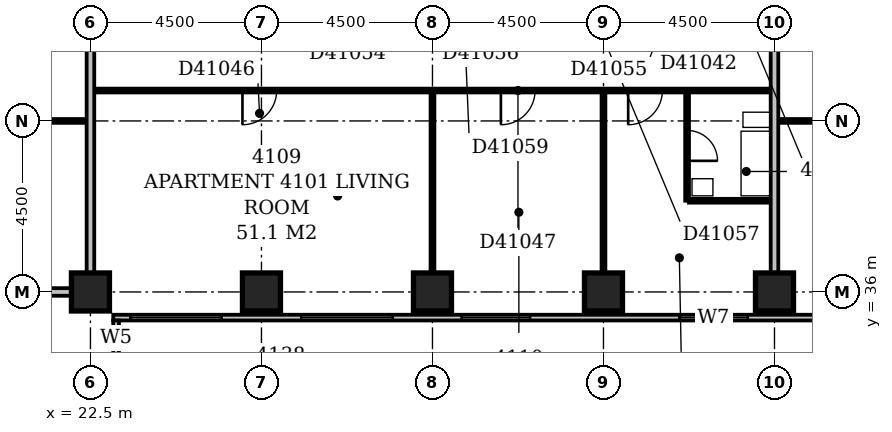
"""IFC4 building model, lengths in metres.
Left out: names, types, materials, properties, quantities, classifications, styles, units other than length and angle.
Written with IfcOpenShell. Run it as: python <this file> out.ifc"""

import sys

from ifc_helpers import new_model, si_unit, direction, frame, frame_2d, origin, origin_2d, place, context, subcontext, project, spatial, rectangle, extrude, element, fill, save


model = new_model("IFC4")
c1 = context("Model", 3, precision=1e-05, world=origin(), true_north=direction((0.0, 1.0)))
c2 = subcontext(c1, "Body", "Model", "MODEL_VIEW")
j1 = project(units=[si_unit("LENGTHUNIT", "METRE"), si_unit("PLANEANGLEUNIT", "RADIAN")], contexts=[c1])
p1 = place(None, origin())
s1 = spatial("IfcSite", under=j1, at=p1, CompositionType="ELEMENT")
p2 = place(p1, origin())
s2 = spatial("IfcBuilding", under=s1, at=p2, CompositionType="ELEMENT")
p3 = place(p2, frame((0.0, 0.0, 162.8)))
s3 = spatial("IfcBuildingStorey", under=s2, at=p3, CompositionType="ELEMENT", Elevation=162.8)
for number, where, z_axis, x_axis in (
    (1, (22.5, 36.0, -0.3), (0.0, 0.0, 1.0), (1.0, 0.0, 0.0)),
    (2, (27.0, 36.0, -0.3), (0.0, 0.0, 1.0), (1.0, 0.0, 0.0)),
    (3, (31.5, 36.0, -0.3), (0.0, 0.0, 1.0), (1.0, 0.0, 0.0)),
    (4, (36.0, 36.0, -0.3), (0.0, 0.0, 1.0), (1.0, 0.0, 0.0)),
    (5, (40.5, 36.0, -0.3), (0.0, 0.0, 1.0), (1.0, 0.0, 0.0)),
):
    element("IfcColumn", number, at=place(p3, frame(where, z_axis=z_axis, x_axis=x_axis)), inside=s3, PredefinedType="COLUMN", context=c2, shape_type="SweptSolid", body=[
        extrude(rectangle(XDim=1.0, YDim=1.0, at=origin_2d()), origin(), (0.0, 0.0, 1.0), 3.6),
    ])
p4 = place(p3, frame((23.175, 17.4, 0.0), z_axis=(0.0, 0.0, 1.0), x_axis=(0.0, 1.0, 0.0)))
e6 = element("IfcWall", 6, at=p4, inside=s3, PredefinedType="STANDARD", context=c2, shape_type="SweptSolid", body=[
    extrude(rectangle(XDim=17.85, YDim=0.15, at=frame_2d((8.925, 0.0))), origin(), (0.0, 0.0, 1.0), 2.7),
])
p5 = place(p4, frame((1.65, 0.0, 0.6)))
e7 = element("IfcOpeningElement", 7, at=p5, cuts=e6, PredefinedType="OPENING", context=c2, shape_type="SweptSolid", body=[
    extrude(rectangle(XDim=2.4, YDim=1.8, at=frame_2d((1.2, 0.9))), frame((0.0, 0.087, 0.0), z_axis=(0.0, -1.0, 0.0), x_axis=(1.0, 0.0, 0.0)), (0.0, 0.0, 1.0), 0.174),
])
p6 = place(p4, frame((6.15, 0.0, 0.6)))
e8 = element("IfcOpeningElement", 8, at=p6, cuts=e6, PredefinedType="OPENING", context=c2, shape_type="SweptSolid", body=[
    extrude(rectangle(XDim=2.4, YDim=1.8, at=frame_2d((1.2, 0.9))), frame((0.0, 0.087, 0.0), z_axis=(0.0, -1.0, 0.0), x_axis=(1.0, 0.0, 0.0)), (0.0, 0.0, 1.0), 0.174),
])
p7 = place(p4, frame((10.65, 0.0, 0.6)))
e9 = element("IfcOpeningElement", 9, at=p7, cuts=e6, PredefinedType="OPENING", context=c2, shape_type="SweptSolid", body=[
    extrude(rectangle(XDim=2.4, YDim=1.8, at=frame_2d((1.2, 0.9))), frame((0.0, 0.087, 0.0), z_axis=(0.0, -1.0, 0.0), x_axis=(1.0, 0.0, 0.0)), (0.0, 0.0, 1.0), 0.174),
])
p8 = place(p4, frame((17.152, 0.0, 0.6)))
e10 = element("IfcOpeningElement", 10, at=p8, cuts=e6, PredefinedType="OPENING", context=c2, shape_type="SweptSolid", body=[
    extrude(rectangle(XDim=0.45, YDim=1.8, at=frame_2d((0.225, 0.9))), frame((0.0, 0.087, 0.0), z_axis=(0.0, -1.0, 0.0), x_axis=(1.0, 0.0, 0.0)), (0.0, 0.0, 1.0), 0.174),
])
p9 = place(p3, frame((23.1, 35.325, 0.0), z_axis=(0.0, 0.0, 1.0), x_axis=(1.0, 0.0, 0.0)))
e11 = element("IfcWall", 11, at=p9, inside=s3, PredefinedType="STANDARD", context=c2, shape_type="SweptSolid", body=[
    extrude(rectangle(XDim=45.15, YDim=0.15, at=frame_2d((22.575, 0.0))), origin(), (0.0, 0.0, 1.0), 2.7),
])
p10 = place(p9, frame((0.45, 0.0, 0.6)))
e12 = element("IfcOpeningElement", 12, at=p10, cuts=e11, PredefinedType="OPENING", context=c2, shape_type="SweptSolid", body=[
    extrude(rectangle(XDim=2.4, YDim=1.8, at=frame_2d((1.2, 0.9))), frame((0.0, 0.087, 0.0), z_axis=(0.0, -1.0, 0.0), x_axis=(1.0, 0.0, 0.0)), (0.0, 0.0, 1.0), 0.174),
])
p11 = place(p9, frame((4.95, 0.0, 0.6)))
e13 = element("IfcOpeningElement", 13, at=p11, cuts=e11, PredefinedType="OPENING", context=c2, shape_type="SweptSolid", body=[
    extrude(rectangle(XDim=2.4, YDim=1.8, at=frame_2d((1.2, 0.9))), frame((0.0, 0.087, 0.0), z_axis=(0.0, -1.0, 0.0), x_axis=(1.0, 0.0, 0.0)), (0.0, 0.0, 1.0), 0.174),
])
p12 = place(p9, frame((9.167, 0.0, 0.6)))
e14 = element("IfcOpeningElement", 14, at=p12, cuts=e11, PredefinedType="OPENING", context=c2, shape_type="SweptSolid", body=[
    extrude(rectangle(XDim=1.8, YDim=1.8, at=frame_2d((0.9, 0.9))), frame((0.0, 0.087, 0.0), z_axis=(0.0, -1.0, 0.0), x_axis=(1.0, 0.0, 0.0)), (0.0, 0.0, 1.0), 0.174),
])
p13 = place(p9, frame((14.895, 0.0, 0.6)))
e15 = element("IfcOpeningElement", 15, at=p13, cuts=e11, PredefinedType="OPENING", context=c2, shape_type="SweptSolid", body=[
    extrude(rectangle(XDim=1.8, YDim=1.8, at=frame_2d((0.9, 0.9))), frame((0.0, 0.087, 0.0), z_axis=(0.0, -1.0, 0.0), x_axis=(1.0, 0.0, 0.0)), (0.0, 0.0, 1.0), 0.174),
])
p14 = place(p9, frame((18.45, 0.0, 0.6)))
e16 = element("IfcOpeningElement", 16, at=p14, cuts=e11, PredefinedType="OPENING", context=c2, shape_type="SweptSolid", body=[
    extrude(rectangle(XDim=2.4, YDim=1.8, at=frame_2d((1.2, 0.9))), frame((0.0, 0.087, 0.0), z_axis=(0.0, -1.0, 0.0), x_axis=(1.0, 0.0, 0.0)), (0.0, 0.0, 1.0), 0.174),
])
p15 = place(p9, frame((22.95, 0.0, 0.6)))
e17 = element("IfcOpeningElement", 17, at=p15, cuts=e11, PredefinedType="OPENING", context=c2, shape_type="SweptSolid", body=[
    extrude(rectangle(XDim=2.4, YDim=1.8, at=frame_2d((1.2, 0.9))), frame((0.0, 0.087, 0.0), z_axis=(0.0, -1.0, 0.0), x_axis=(1.0, 0.0, 0.0)), (0.0, 0.0, 1.0), 0.174),
])
p16 = place(p9, frame((27.45, 0.0, 0.6)))
e18 = element("IfcOpeningElement", 18, at=p16, cuts=e11, PredefinedType="OPENING", context=c2, shape_type="SweptSolid", body=[
    extrude(rectangle(XDim=2.4, YDim=1.8, at=frame_2d((1.2, 0.9))), frame((0.0, 0.087, 0.0), z_axis=(0.0, -1.0, 0.0), x_axis=(1.0, 0.0, 0.0)), (0.0, 0.0, 1.0), 0.174),
])
p17 = place(p9, frame((31.95, 0.0, 0.6)))
e19 = element("IfcOpeningElement", 19, at=p17, cuts=e11, PredefinedType="OPENING", context=c2, shape_type="SweptSolid", body=[
    extrude(rectangle(XDim=2.4, YDim=1.8, at=frame_2d((1.2, 0.9))), frame((0.0, 0.087, 0.0), z_axis=(0.0, -1.0, 0.0), x_axis=(1.0, 0.0, 0.0)), (0.0, 0.0, 1.0), 0.174),
])
p18 = place(p9, frame((36.45, 0.0, 0.6)))
e20 = element("IfcOpeningElement", 20, at=p18, cuts=e11, PredefinedType="OPENING", context=c2, shape_type="SweptSolid", body=[
    extrude(rectangle(XDim=2.4, YDim=1.8, at=frame_2d((1.2, 0.9))), frame((0.0, 0.087, 0.0), z_axis=(0.0, -1.0, 0.0), x_axis=(1.0, 0.0, 0.0)), (0.0, 0.0, 1.0), 0.174),
])
p19 = place(p9, frame((40.61, 0.0, 0.6)))
e21 = element("IfcOpeningElement", 21, at=p19, cuts=e11, PredefinedType="OPENING", context=c2, shape_type="SweptSolid", body=[
    extrude(rectangle(XDim=1.2, YDim=1.8, at=frame_2d((0.6, 0.9))), frame((0.0, 0.087, 0.0), z_axis=(0.0, -1.0, 0.0), x_axis=(1.0, 0.0, 0.0)), (0.0, 0.0, 1.0), 0.174),
])
for number, where, z_axis, x_axis in (
    (22, (9.1, 36.0, 0.0), (0.0, 0.0, 1.0), (1.0, 0.0, 0.0)),
    (23, (22.5, 36.5, 0.0), (0.0, 0.0, 1.0), (0.0, 1.0, 0.0)),
):
    element("IfcWall", number, at=place(p3, frame(where, z_axis=z_axis, x_axis=x_axis)), inside=s3, PredefinedType="PARTITIONING", context=c2, shape_type="SweptSolid", body=[
        extrude(rectangle(XDim=12.9, YDim=0.2, at=frame_2d((6.45, 0.0))), origin(), (0.0, 0.0, 1.0), 3.3),
    ])
p20 = place(p3, frame((31.5, 36.5, 0.0), z_axis=(0.0, 0.0, 1.0), x_axis=(0.0, 1.0, 0.0)))
e24 = element("IfcWall", 24, at=p20, inside=s3, PredefinedType="PARTITIONING", context=c2, shape_type="SweptSolid", body=[
    extrude(rectangle(XDim=4.75, YDim=0.1, at=frame_2d((2.375, 0.0))), origin(), (0.0, 0.0, 1.0), 3.3),
])
p21 = place(p3, frame((36.0, 36.5, 0.0), z_axis=(0.0, 0.0, 1.0), x_axis=(0.0, 1.0, 0.0)))
e25 = element("IfcWall", 25, at=p21, inside=s3, PredefinedType="PARTITIONING", context=c2, shape_type="SweptSolid", body=[
    extrude(rectangle(XDim=4.75, YDim=0.1, at=frame_2d((2.375, 0.0))), origin(), (0.0, 0.0, 1.0), 2.4),
])
p22 = place(p3, frame((40.5, 36.5, 0.0), z_axis=(0.0, 0.0, 1.0), x_axis=(0.0, 1.0, 0.0)))
e26 = element("IfcWall", 26, at=p22, inside=s3, PredefinedType="PARTITIONING", context=c2, shape_type="SweptSolid", body=[
    extrude(rectangle(XDim=12.9, YDim=0.2, at=frame_2d((6.45, 0.0))), origin(), (0.0, 0.0, 1.0), 3.3),
])
p23 = place(p3, frame((38.2, 38.4, 0.0), z_axis=(0.0, 0.0, 1.0), x_axis=(0.0, 1.0, 0.0)))
e27 = element("IfcWall", 27, at=p23, inside=s3, PredefinedType="PLUMBINGWALL", context=c2, shape_type="SweptSolid", body=[
    extrude(rectangle(XDim=2.85, YDim=0.1, at=frame_2d((1.425, 0.0))), origin(), (0.0, 0.0, 1.0), 3.3),
])
p24 = place(p23, frame((1.05, 0.0, 0.0)))
e28 = element("IfcOpeningElement", 28, at=p24, cuts=e27, PredefinedType="OPENING", context=c2, shape_type="SweptSolid", body=[
    extrude(rectangle(XDim=0.8, YDim=2.1, at=frame_2d((0.4, 1.05))), frame((0.0, 0.062, 0.0), z_axis=(0.0, -1.0, 0.0), x_axis=(1.0, 0.0, 0.0)), (0.0, 0.0, 1.0), 0.124),
])
p25 = place(p3, frame((38.25, 38.4, 0.0), z_axis=(0.0, 0.0, 1.0), x_axis=(1.0, 0.0, 0.0)))
e29 = element("IfcWall", 29, at=p25, inside=s3, PredefinedType="PLUMBINGWALL", context=c2, shape_type="SweptSolid", body=[
    extrude(rectangle(XDim=2.15, YDim=0.1, at=frame_2d((1.075, 0.0))), origin(), (0.0, 0.0, 1.0), 3.3),
])
p26 = place(p3, frame((9.1, 40.5, 0.0), z_axis=(0.0, 0.0, 1.0), x_axis=(1.0, 0.0, 0.0)))
e30 = element("IfcWall", 30, at=p26, inside=s3, PredefinedType="PARTITIONING", context=c2, shape_type="SweptSolid", body=[
    extrude(rectangle(XDim=13.3, YDim=0.1, at=frame_2d((6.65, 0.0))), origin(), (0.0, 0.0, 1.0), 3.3),
])
p27 = place(p3, frame((40.6, 40.5, 0.0), z_axis=(0.0, 0.0, 1.0), x_axis=(1.0, 0.0, 0.0)))
e31 = element("IfcWall", 31, at=p27, inside=s3, PredefinedType="PARTITIONING", context=c2, shape_type="SweptSolid", body=[
    extrude(rectangle(XDim=4.3, YDim=0.1, at=frame_2d((2.15, 0.0))), origin(), (0.0, 0.0, 1.0), 3.3),
])
p28 = place(p27, frame((1.7, 0.0, 0.0)))
e32 = element("IfcOpeningElement", 32, at=p28, cuts=e31, PredefinedType="OPENING", context=c2, shape_type="SweptSolid", body=[
    extrude(rectangle(XDim=0.9, YDim=2.1, at=frame_2d((0.45, 1.05))), frame((0.0, 0.062, 0.0), z_axis=(0.0, -1.0, 0.0), x_axis=(1.0, 0.0, 0.0)), (0.0, 0.0, 1.0), 0.124),
])
p29 = place(p3, frame((22.6, 41.3, 0.0), z_axis=(0.0, 0.0, 1.0), x_axis=(1.0, 0.0, 0.0)))
e33 = element("IfcWall", 33, at=p29, inside=s3, PredefinedType="PARTITIONING", context=c2, shape_type="SweptSolid", body=[
    extrude(rectangle(XDim=17.8, YDim=0.1, at=frame_2d((8.9, 0.0))), origin(), (0.0, 0.0, 1.0), 3.3),
])
p30 = place(p29, frame((3.9, 0.0, 0.0)))
e34 = element("IfcOpeningElement", 34, at=p30, cuts=e33, PredefinedType="OPENING", context=c2, shape_type="SweptSolid", body=[
    extrude(rectangle(XDim=0.9, YDim=2.1, at=frame_2d((0.45, 1.05))), frame((0.0, 0.062, 0.0), z_axis=(0.0, -1.0, 0.0), x_axis=(1.0, 0.0, 0.0)), (0.0, 0.0, 1.0), 0.124),
])
p31 = place(p29, frame((10.7, 0.0, 0.0)))
e35 = element("IfcOpeningElement", 35, at=p31, cuts=e33, PredefinedType="OPENING", context=c2, shape_type="SweptSolid", body=[
    extrude(rectangle(XDim=0.9, YDim=2.1, at=frame_2d((0.45, 1.05))), frame((0.0, 0.062, 0.0), z_axis=(0.0, -1.0, 0.0), x_axis=(1.0, 0.0, 0.0)), (0.0, 0.0, 1.0), 0.124),
])
p32 = place(p29, frame((14.05, 0.0, 0.0)))
e36 = element("IfcOpeningElement", 36, at=p32, cuts=e33, PredefinedType="OPENING", context=c2, shape_type="SweptSolid", body=[
    extrude(rectangle(XDim=0.9, YDim=2.1, at=frame_2d((0.45, 1.05))), frame((0.0, 0.062, 0.0), z_axis=(0.0, -1.0, 0.0), x_axis=(1.0, 0.0, 0.0)), (0.0, 0.0, 1.0), 0.124),
])
p33 = place(p8, origin())
e37 = element("IfcWindow", 37, at=p33, inside=s3, PartitioningType="SINGLE_PANEL", PredefinedType="WINDOW", context=c2, shape_type="SweptSolid", body=[
    extrude(rectangle(XDim=0.45, YDim=1.8, at=frame_2d((0.225, 0.9))), frame((0.0, 0.03, 0.0), z_axis=(0.0, -1.0, 0.0), x_axis=(1.0, 0.0, 0.0)), (0.0, 0.0, 1.0), 0.06),
])
fill(e10, e37)
p34 = place(p10, origin())
e38 = element("IfcWindow", 38, at=p34, inside=s3, PartitioningType="SINGLE_PANEL", PredefinedType="WINDOW", context=c2, shape_type="SweptSolid", body=[
    extrude(rectangle(XDim=2.4, YDim=1.8, at=frame_2d((1.2, 0.9))), frame((0.0, 0.03, 0.0), z_axis=(0.0, -1.0, 0.0), x_axis=(1.0, 0.0, 0.0)), (0.0, 0.0, 1.0), 0.06),
])
fill(e12, e38)
p35 = place(p11, origin())
e39 = element("IfcWindow", 39, at=p35, inside=s3, PartitioningType="SINGLE_PANEL", PredefinedType="WINDOW", context=c2, shape_type="SweptSolid", body=[
    extrude(rectangle(XDim=2.4, YDim=1.8, at=frame_2d((1.2, 0.9))), frame((0.0, 0.03, 0.0), z_axis=(0.0, -1.0, 0.0), x_axis=(1.0, 0.0, 0.0)), (0.0, 0.0, 1.0), 0.06),
])
fill(e13, e39)
p36 = place(p12, origin())
e40 = element("IfcWindow", 40, at=p36, inside=s3, PartitioningType="SINGLE_PANEL", PredefinedType="WINDOW", context=c2, shape_type="SweptSolid", body=[
    extrude(rectangle(XDim=1.8, YDim=1.8, at=frame_2d((0.9, 0.9))), frame((0.0, 0.03, 0.0), z_axis=(0.0, -1.0, 0.0), x_axis=(1.0, 0.0, 0.0)), (0.0, 0.0, 1.0), 0.06),
])
fill(e14, e40)
p37 = place(p13, origin())
e41 = element("IfcWindow", 41, at=p37, inside=s3, PartitioningType="SINGLE_PANEL", PredefinedType="WINDOW", context=c2, shape_type="SweptSolid", body=[
    extrude(rectangle(XDim=1.8, YDim=1.8, at=frame_2d((0.9, 0.9))), frame((0.0, 0.03, 0.0), z_axis=(0.0, -1.0, 0.0), x_axis=(1.0, 0.0, 0.0)), (0.0, 0.0, 1.0), 0.06),
])
fill(e15, e41)
p38 = place(p24, frame((0.8, 0.0, 0.0), z_axis=(0.0, 0.0, 1.0), x_axis=(-1.0, 0.0, 0.0)))
e42 = element("IfcDoor", 42, at=p38, inside=s3, OperationType="SINGLE_SWING_RIGHT", PredefinedType="DOOR", context=c2, shape_type="SweptSolid", body=[
    extrude(rectangle(XDim=0.8, YDim=2.1, at=frame_2d((0.4, 1.05))), frame((0.0, 0.025, 0.0), z_axis=(0.0, -1.0, 0.0), x_axis=(1.0, 0.0, 0.0)), (0.0, 0.0, 1.0), 0.05),
])
fill(e28, e42)
p39 = place(p30, frame((0.9, 0.0, 0.0), z_axis=(0.0, 0.0, 1.0), x_axis=(-1.0, 0.0, 0.0)))
e43 = element("IfcDoor", 43, at=p39, inside=s3, OperationType="SINGLE_SWING_RIGHT", PredefinedType="DOOR", context=c2, shape_type="SweptSolid", body=[
    extrude(rectangle(XDim=0.9, YDim=2.1, at=frame_2d((0.45, 1.05))), frame((0.0, 0.025, 0.0), z_axis=(0.0, -1.0, 0.0), x_axis=(1.0, 0.0, 0.0)), (0.0, 0.0, 1.0), 0.05),
])
fill(e34, e43)
p40 = place(p31, frame((0.9, 0.0, 0.0), z_axis=(0.0, 0.0, 1.0), x_axis=(-1.0, 0.0, 0.0)))
e44 = element("IfcDoor", 44, at=p40, inside=s3, OperationType="SINGLE_SWING_RIGHT", PredefinedType="DOOR", context=c2, shape_type="SweptSolid", body=[
    extrude(rectangle(XDim=0.9, YDim=2.1, at=frame_2d((0.45, 1.05))), frame((0.0, 0.025, 0.0), z_axis=(0.0, -1.0, 0.0), x_axis=(1.0, 0.0, 0.0)), (0.0, 0.0, 1.0), 0.05),
])
fill(e35, e44)
p41 = place(p32, frame((0.9, 0.0, 0.0), z_axis=(0.0, 0.0, 1.0), x_axis=(-1.0, 0.0, 0.0)))
e45 = element("IfcDoor", 45, at=p41, inside=s3, OperationType="SINGLE_SWING_RIGHT", PredefinedType="DOOR", context=c2, shape_type="SweptSolid", body=[
    extrude(rectangle(XDim=0.9, YDim=2.1, at=frame_2d((0.45, 1.05))), frame((0.0, 0.025, 0.0), z_axis=(0.0, -1.0, 0.0), x_axis=(1.0, 0.0, 0.0)), (0.0, 0.0, 1.0), 0.05),
])
fill(e36, e45)
save(model, sys.argv[1])
